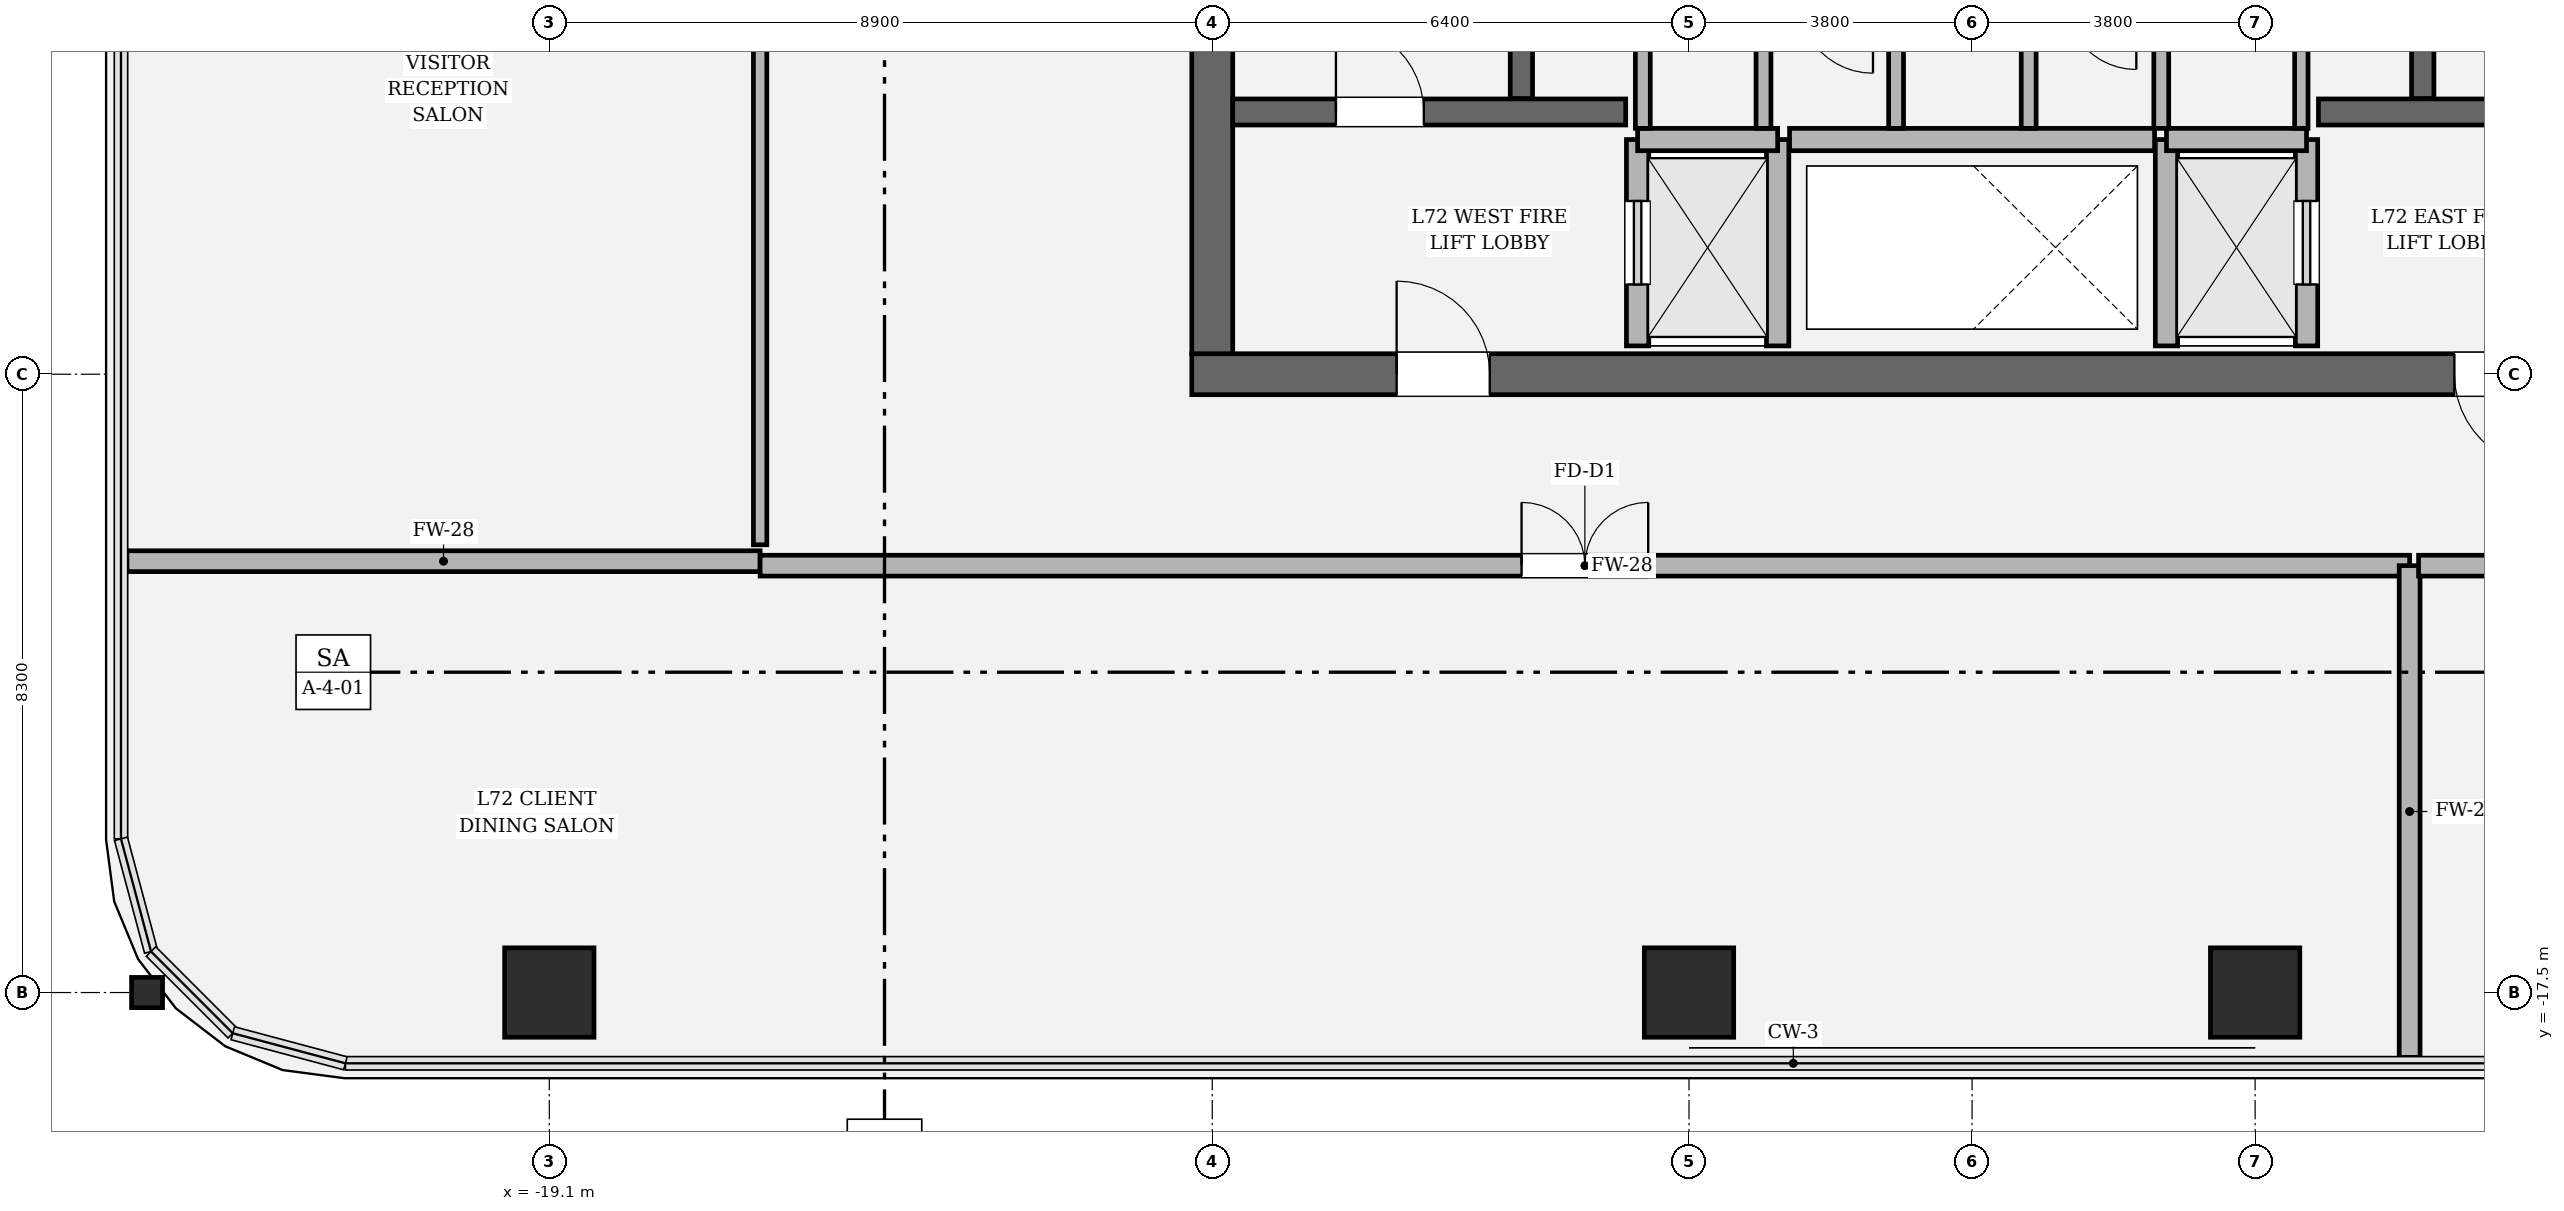
"""IFC4 building model, lengths in metres.
Left out: names, types, materials, properties, quantities, classifications, styles, units other than length and angle.
Written with IfcOpenShell. Run it as: python <this file> out.ifc"""

import sys

from ifc_helpers import new_model, si_unit, direction, frame, frame_2d, origin, origin_2d, place, context, subcontext, project, spatial, rectangle, hollow_rectangle, i_section, extrude, element, fill, save


model = new_model("IFC4")
c1 = context("Model", 3, precision=1e-05, world=origin(), true_north=direction((0.0, 1.0)))
c2 = subcontext(c1, "Body", "Model", "MODEL_VIEW")
j1 = project(units=[si_unit("LENGTHUNIT", "METRE"), si_unit("PLANEANGLEUNIT", "RADIAN")], contexts=[c1])
p1 = place(None, origin())
s1 = spatial("IfcSite", under=j1, at=p1, CompositionType="ELEMENT")
p2 = place(p1, origin())
s2 = spatial("IfcBuilding", under=s1, at=p2, CompositionType="ELEMENT")
p3 = place(p2, frame((0.0, 0.0, 304.8)))
s3 = spatial("IfcBuildingStorey", under=s2, at=p3, CompositionType="ELEMENT", Elevation=304.8)
p4 = place(p3, frame((10.475, -9.2, 0.0), z_axis=(0.0, 0.0, 1.0), x_axis=(-1.0, 0.0, 0.0)))
e1 = element("IfcWall", 1, at=p4, inside=s3, PredefinedType="SHEAR", context=c2, shape_type="SweptSolid", body=[
    extrude(rectangle(XDim=20.95, YDim=0.55, at=frame_2d((10.475, 0.0))), origin(), (0.0, 0.0, 1.0), 4.2),
])
p5 = place(p4, frame((2.75, 0.0, 0.0)))
e2 = element("IfcOpeningElement", 2, at=p5, cuts=e1, PredefinedType="OPENING", context=c2, shape_type="SweptSolid", body=[
    extrude(rectangle(XDim=1.25, YDim=2.25, at=frame_2d((0.625, 1.125))), frame((0.0, 0.285, 0.0), z_axis=(0.0, -1.0, 0.0), x_axis=(1.0, 0.0, 0.0)), (0.0, 0.0, 1.0), 0.57),
])
p6 = place(p4, frame((16.95, 0.0, 0.0)))
e3 = element("IfcOpeningElement", 3, at=p6, cuts=e1, PredefinedType="OPENING", context=c2, shape_type="SweptSolid", body=[
    extrude(rectangle(XDim=1.25, YDim=2.25, at=frame_2d((0.625, 1.125))), frame((0.0, 0.285, 0.0), z_axis=(0.0, -1.0, 0.0), x_axis=(1.0, 0.0, 0.0)), (0.0, 0.0, 1.0), 0.57),
])
p7 = place(p3, frame((-10.2, -8.925, 0.0), z_axis=(0.0, 0.0, 1.0), x_axis=(0.0, 1.0, 0.0)))
e4 = element("IfcWall", 4, at=p7, inside=s3, PredefinedType="SHEAR", context=c2, shape_type="SweptSolid", body=[
    extrude(rectangle(XDim=17.85, YDim=0.55, at=frame_2d((8.925, 0.0))), origin(), (0.0, 0.0, 1.0), 4.2),
])
p8 = place(p7, frame((12.715, 0.0, 0.0)))
e5 = element("IfcOpeningElement", 5, at=p8, cuts=e4, PredefinedType="OPENING", context=c2, shape_type="SweptSolid", body=[
    extrude(rectangle(XDim=1.18, YDim=2.2, at=frame_2d((0.59, 1.1))), frame((0.0, 0.285, 0.0), z_axis=(0.0, -1.0, 0.0), x_axis=(1.0, 0.0, 0.0)), (0.0, 0.0, 1.0), 0.57),
])
for number, where, z_axis, x_axis in (
    (6, (-6.05, -5.5, 0.0), (0.0, 0.0, 1.0), (0.0, 1.0, 0.0)),
    (7, (6.05, 3.45, 0.0), (0.0, 0.0, 1.0), (0.0, -1.0, 0.0)),
):
    element("IfcWall", number, at=place(p3, frame(where, z_axis=z_axis, x_axis=x_axis)), inside=s3, PredefinedType="SOLIDWALL", context=c2, shape_type="SweptSolid", body=[
        extrude(rectangle(XDim=8.95, YDim=0.3, at=frame_2d((4.475, 0.0))), origin(), (0.0, 0.0, 1.0), 4.2),
    ])
p9 = place(p3, frame((-9.925, -5.68, 0.0), z_axis=(0.0, 0.0, 1.0), x_axis=(1.0, 0.0, 0.0)))
e8 = element("IfcWall", 8, at=p9, inside=s3, PredefinedType="SOLIDWALL", context=c2, shape_type="SweptSolid", body=[
    extrude(rectangle(XDim=5.275, YDim=0.35, at=frame_2d((2.638, 0.0))), origin(), (0.0, 0.0, 1.0), 4.2),
])
p10 = place(p9, frame((1.385, 0.0, 0.0)))
e9 = element("IfcOpeningElement", 9, at=p10, cuts=e8, PredefinedType="OPENING", context=c2, shape_type="SweptSolid", body=[
    extrude(rectangle(XDim=1.18, YDim=2.2, at=frame_2d((0.59, 1.1))), frame((0.0, 0.185, 0.0), z_axis=(0.0, -1.0, 0.0), x_axis=(1.0, 0.0, 0.0)), (0.0, 0.0, 1.0), 0.37),
])
p11 = place(p3, frame((4.65, -5.68, 0.0), z_axis=(0.0, 0.0, 1.0), x_axis=(1.0, 0.0, 0.0)))
e10 = element("IfcWall", 10, at=p11, inside=s3, PredefinedType="SOLIDWALL", context=c2, shape_type="SweptSolid", body=[
    extrude(rectangle(XDim=5.275, YDim=0.35, at=frame_2d((2.638, 0.0))), origin(), (0.0, 0.0, 1.0), 4.2),
])
p12 = place(p11, frame((2.71, 0.0, 0.0)))
e11 = element("IfcOpeningElement", 11, at=p12, cuts=e10, PredefinedType="OPENING", context=c2, shape_type="SweptSolid", body=[
    extrude(rectangle(XDim=1.18, YDim=2.2, at=frame_2d((0.59, 1.1))), frame((0.0, 0.185, 0.0), z_axis=(0.0, -1.0, 0.0), x_axis=(1.0, 0.0, 0.0)), (0.0, 0.0, 1.0), 0.37),
])
for number, where, z_axis, x_axis in (
    (12, (-19.1, -17.5, 0.0), (0.0, 0.0, 1.0), (1.0, 0.0, 0.0)),
    (13, (-3.8, -17.5, 0.0), (0.0, 0.0, 1.0), (1.0, 0.0, 0.0)),
    (14, (3.8, -17.5, 0.0), (0.0, 0.0, 1.0), (1.0, 0.0, 0.0)),
):
    element("IfcColumn", number, at=place(p3, frame(where, z_axis=z_axis, x_axis=x_axis)), inside=s3, PredefinedType="COLUMN", context=c2, shape_type="SweptSolid", body=[
        extrude(hollow_rectangle(XDim=1.2, YDim=1.2, WallThickness=0.035, at=origin_2d()), origin(), (0.0, 0.0, 1.0), 4.2),
    ])
p13 = place(p3, frame((-24.5, -17.5, 0.0), z_axis=(0.0, 0.0, 1.0), x_axis=(0.0, 1.0, 0.0)))
e15 = element("IfcColumn", 15, at=p13, inside=s3, PredefinedType="COLUMN", context=c2, shape_type="SweptSolid", body=[
    extrude(i_section(OverallWidth=0.406, OverallDepth=0.416, WebThickness=0.029, FlangeThickness=0.048, FilletRadius=0.018, at=origin_2d()), origin(), (0.0, 0.0, 1.0), 4.198),
])
p14 = place(p3, frame((-4.49, -8.82, 0.0), z_axis=(0.0, 0.0, 1.0), x_axis=(0.0, 1.0, 0.0)))
e16 = element("IfcWall", 16, at=p14, inside=s3, PredefinedType="SOLIDWALL", context=c2, shape_type="SweptSolid", body=[
    extrude(rectangle(XDim=2.77, YDim=0.3, at=frame_2d((1.385, 0.0))), origin(), (0.0, 0.0, 1.0), 4.0),
])
p15 = place(p14, frame((0.825, 0.0, 0.0)))
e17 = element("IfcOpeningElement", 17, at=p15, cuts=e16, PredefinedType="OPENING", context=c2, shape_type="SweptSolid", body=[
    extrude(rectangle(XDim=1.12, YDim=2.25, at=frame_2d((0.56, 1.125))), frame((0.0, 0.16, 0.0), z_axis=(0.0, -1.0, 0.0), x_axis=(1.0, 0.0, 0.0)), (0.0, 0.0, 1.0), 0.32),
])
p16 = place(p3, frame((-2.61, -8.82, 0.0), z_axis=(0.0, 0.0, 1.0), x_axis=(0.0, 1.0, 0.0)))
e18 = element("IfcWall", 18, at=p16, inside=s3, PredefinedType="SOLIDWALL", context=c2, shape_type="SweptSolid", body=[
    extrude(rectangle(XDim=2.77, YDim=0.3, at=frame_2d((1.385, 0.0))), origin(), (0.0, 0.0, 1.0), 4.0),
])
p17 = place(p3, frame((-4.49, -6.05, 0.0), z_axis=(0.0, 0.0, 1.0), x_axis=(1.0, 0.0, 0.0)))
e19 = element("IfcWall", 19, at=p17, inside=s3, PredefinedType="SOLIDWALL", context=c2, shape_type="SweptSolid", body=[
    extrude(rectangle(XDim=1.88, YDim=0.3, at=frame_2d((0.94, 0.0))), origin(), (0.0, 0.0, 1.0), 4.0),
])
p18 = place(p3, frame((4.49, -8.82, 0.0), z_axis=(0.0, 0.0, 1.0), x_axis=(0.0, 1.0, 0.0)))
e20 = element("IfcWall", 20, at=p18, inside=s3, PredefinedType="SOLIDWALL", context=c2, shape_type="SweptSolid", body=[
    extrude(rectangle(XDim=2.77, YDim=0.3, at=frame_2d((1.385, 0.0))), origin(), (0.0, 0.0, 1.0), 4.0),
])
p19 = place(p18, frame((0.825, 0.0, 0.0)))
e21 = element("IfcOpeningElement", 21, at=p19, cuts=e20, PredefinedType="OPENING", context=c2, shape_type="SweptSolid", body=[
    extrude(rectangle(XDim=1.12, YDim=2.25, at=frame_2d((0.56, 1.125))), frame((0.0, 0.16, 0.0), z_axis=(0.0, -1.0, 0.0), x_axis=(1.0, 0.0, 0.0)), (0.0, 0.0, 1.0), 0.32),
])
p20 = place(p3, frame((2.61, -8.82, 0.0), z_axis=(0.0, 0.0, 1.0), x_axis=(0.0, 1.0, 0.0)))
e22 = element("IfcWall", 22, at=p20, inside=s3, PredefinedType="SOLIDWALL", context=c2, shape_type="SweptSolid", body=[
    extrude(rectangle(XDim=2.77, YDim=0.3, at=frame_2d((1.385, 0.0))), origin(), (0.0, 0.0, 1.0), 4.0),
])
p21 = place(p3, frame((2.61, -6.05, 0.0), z_axis=(0.0, 0.0, 1.0), x_axis=(1.0, 0.0, 0.0)))
e23 = element("IfcWall", 23, at=p21, inside=s3, PredefinedType="SOLIDWALL", context=c2, shape_type="SweptSolid", body=[
    extrude(rectangle(XDim=1.88, YDim=0.3, at=frame_2d((0.94, 0.0))), origin(), (0.0, 0.0, 1.0), 4.0),
])
p22 = place(p3, frame((-2.45, -6.05, 0.0), z_axis=(0.0, 0.0, 1.0), x_axis=(1.0, 0.0, 0.0)))
e24 = element("IfcWall", 24, at=p22, inside=s3, PredefinedType="SOLIDWALL", context=c2, shape_type="SweptSolid", body=[
    extrude(rectangle(XDim=4.9, YDim=0.3, at=frame_2d((2.45, 0.0))), origin(), (0.0, 0.0, 1.0), 4.0),
])
for number, where, z_axis, x_axis in (
    (25, (-2.8, -5.9, 0.0), (0.0, 0.0, 1.0), (0.0, 1.0, 0.0)),
    (26, (-4.42, -4.16, 0.0), (0.0, 0.0, 1.0), (0.0, -1.0, 0.0)),
    (27, (-1.02, -5.9, 0.0), (0.0, 0.0, 1.0), (0.0, 1.0, 0.0)),
    (28, (0.76, -5.9, 0.0), (0.0, 0.0, 1.0), (0.0, 1.0, 0.0)),
    (29, (2.54, -5.9, 0.0), (0.0, 0.0, 1.0), (0.0, 1.0, 0.0)),
):
    element("IfcWall", number, at=place(p3, frame(where, z_axis=z_axis, x_axis=x_axis)), inside=s3, PredefinedType="SOLIDWALL", context=c2, shape_type="SweptSolid", body=[
        extrude(rectangle(XDim=1.74, YDim=0.2, at=frame_2d((0.87, 0.0))), origin(), (0.0, 0.0, 1.0), 4.0),
    ])
p23 = place(p3, frame((4.42, -5.9, 0.0), z_axis=(0.0, 0.0, 1.0), x_axis=(0.0, 1.0, 0.0)))
e30 = element("IfcWall", 30, at=p23, inside=s3, PredefinedType="PARTITIONING", context=c2, shape_type="SweptSolid", body=[
    extrude(rectangle(XDim=1.74, YDim=0.18, at=frame_2d((0.87, 0.0))), origin(), (0.0, 0.0, 1.0), 4.0),
])
p24 = place(p3, frame((-24.77, -11.71, 0.0), z_axis=(0.0, 0.0, 1.0), x_axis=(1.0, 0.0, 0.0)))
e31 = element("IfcWall", 31, at=p24, inside=s3, PredefinedType="SOLIDWALL", context=c2, shape_type="SweptSolid", body=[
    extrude(rectangle(XDim=8.5, YDim=0.28, at=frame_2d((4.25, 0.0))), origin(), (0.0, 0.0, 1.0), 2.714),
])
p25 = place(p3, frame((-16.27, -11.77, 0.0), z_axis=(0.0, 0.0, 1.0), x_axis=(1.0, 0.0, 0.0)))
e32 = element("IfcWall", 32, at=p25, inside=s3, PredefinedType="SOLIDWALL", context=c2, shape_type="SweptSolid", body=[
    extrude(rectangle(XDim=22.144, YDim=0.28, at=frame_2d((11.072, 0.0))), origin(), (0.0, 0.0, 1.0), 3.394),
])
p26 = place(p25, frame((10.222, 0.0, 0.0)))
e33 = element("IfcOpeningElement", 33, at=p26, cuts=e32, PredefinedType="OPENING", context=c2, shape_type="SweptSolid", body=[
    extrude(rectangle(XDim=1.7, YDim=2.3, at=frame_2d((0.85, 1.15))), frame((0.0, 0.15, 0.0), z_axis=(0.0, -1.0, 0.0), x_axis=(1.0, 0.0, 0.0)), (0.0, 0.0, 1.0), 0.3),
])
p27 = place(p3, frame((5.874, -11.77, 0.0), z_axis=(0.0, 0.0, 1.0), x_axis=(0.0, -1.0, 0.0)))
e34 = element("IfcWall", 34, at=p27, inside=s3, PredefinedType="SOLIDWALL", context=c2, shape_type="SweptSolid", body=[
    extrude(rectangle(XDim=6.6, YDim=0.28, at=frame_2d((3.3, 0.0))), origin(), (0.0, 0.0, 1.0), 3.394),
])
p28 = place(p3, frame((5.994, -11.77, 0.0), z_axis=(0.0, 0.0, 1.0), x_axis=(1.0, 0.0, 0.0)))
e35 = element("IfcWall", 35, at=p28, inside=s3, PredefinedType="SOLIDWALL", context=c2, shape_type="SweptSolid", body=[
    extrude(rectangle(XDim=6.776, YDim=0.28, at=frame_2d((3.388, 0.0))), origin(), (0.0, 0.0, 1.0), 3.394),
])
p29 = place(p28, frame((2.538, 0.0, 0.0)))
e36 = element("IfcOpeningElement", 36, at=p29, cuts=e35, PredefinedType="OPENING", context=c2, shape_type="SweptSolid", body=[
    extrude(rectangle(XDim=1.7, YDim=2.3, at=frame_2d((0.85, 1.15))), frame((0.0, 0.15, 0.0), z_axis=(0.0, -1.0, 0.0), x_axis=(1.0, 0.0, 0.0)), (0.0, 0.0, 1.0), 0.3),
])
p30 = place(p3, frame((-16.27, 5.67, 0.0), z_axis=(0.0, 0.0, 1.0), x_axis=(0.0, -1.0, 0.0)))
e37 = element("IfcWall", 37, at=p30, inside=s3, PredefinedType="PARTITIONING", context=c2, shape_type="SweptSolid", body=[
    extrude(rectangle(XDim=17.16, YDim=0.18, at=frame_2d((8.58, 0.0))), origin(), (0.0, 0.0, 1.0), 3.394),
])
p31 = place(p30, frame((8.055, 0.0, 0.0)))
e38 = element("IfcOpeningElement", 38, at=p31, cuts=e37, PredefinedType="OPENING", context=c2, shape_type="SweptSolid", body=[
    extrude(rectangle(XDim=1.05, YDim=2.2, at=frame_2d((0.525, 1.1))), frame((0.0, 0.1, 0.0), z_axis=(0.0, -1.0, 0.0), x_axis=(1.0, 0.0, 0.0)), (0.0, 0.0, 1.0), 0.2),
])
p32 = place(p10, origin())
e39 = element("IfcDoor", 39, at=p32, inside=s3, OperationType="SINGLE_SWING_LEFT", PredefinedType="DOOR", context=c2, shape_type="SweptSolid", body=[
    extrude(rectangle(XDim=1.18, YDim=2.2, at=frame_2d((0.59, 1.1))), frame((0.0, 0.025, 0.0), z_axis=(0.0, -1.0, 0.0), x_axis=(1.0, 0.0, 0.0)), (0.0, 0.0, 1.0), 0.05),
])
fill(e9, e39)
p33 = place(p5, origin())
e40 = element("IfcDoor", 40, at=p33, inside=s3, OperationType="SINGLE_SWING_LEFT", PredefinedType="DOOR", context=c2, shape_type="SweptSolid", body=[
    extrude(rectangle(XDim=1.25, YDim=2.25, at=frame_2d((0.625, 1.125))), frame((0.0, 0.025, 0.0), z_axis=(0.0, -1.0, 0.0), x_axis=(1.0, 0.0, 0.0)), (0.0, 0.0, 1.0), 0.05),
])
fill(e2, e40)
p34 = place(p6, origin())
e41 = element("IfcDoor", 41, at=p34, inside=s3, OperationType="SINGLE_SWING_RIGHT", PredefinedType="DOOR", context=c2, shape_type="SweptSolid", body=[
    extrude(rectangle(XDim=1.25, YDim=2.25, at=frame_2d((0.625, 1.125))), frame((0.0, 0.025, 0.0), z_axis=(0.0, -1.0, 0.0), x_axis=(1.0, 0.0, 0.0)), (0.0, 0.0, 1.0), 0.05),
])
fill(e3, e41)
p35 = place(p15, origin())
e42 = element("IfcDoor", 42, at=p35, inside=s3, OperationType="SLIDING_TO_LEFT", PredefinedType="DOOR", context=c2, shape_type="SweptSolid", body=[
    extrude(rectangle(XDim=1.12, YDim=2.25, at=frame_2d((0.56, 1.125))), frame((0.0, 0.025, 0.0), z_axis=(0.0, -1.0, 0.0), x_axis=(1.0, 0.0, 0.0)), (0.0, 0.0, 1.0), 0.05),
])
fill(e17, e42)
p36 = place(p19, origin())
e43 = element("IfcDoor", 43, at=p36, inside=s3, OperationType="SLIDING_TO_RIGHT", PredefinedType="DOOR", context=c2, shape_type="SweptSolid", body=[
    extrude(rectangle(XDim=1.12, YDim=2.25, at=frame_2d((0.56, 1.125))), frame((0.0, 0.025, 0.0), z_axis=(0.0, -1.0, 0.0), x_axis=(1.0, 0.0, 0.0)), (0.0, 0.0, 1.0), 0.05),
])
fill(e21, e43)
p37 = place(p26, origin())
e44 = element("IfcDoor", 44, at=p37, inside=s3, OperationType="DOUBLE_DOOR_SINGLE_SWING", PredefinedType="DOOR", context=c2, shape_type="SweptSolid", body=[
    extrude(rectangle(XDim=1.7, YDim=2.3, at=frame_2d((0.85, 1.15))), frame((0.0, 0.025, 0.0), z_axis=(0.0, -1.0, 0.0), x_axis=(1.0, 0.0, 0.0)), (0.0, 0.0, 1.0), 0.05),
])
fill(e33, e44)
save(model, sys.argv[1])
